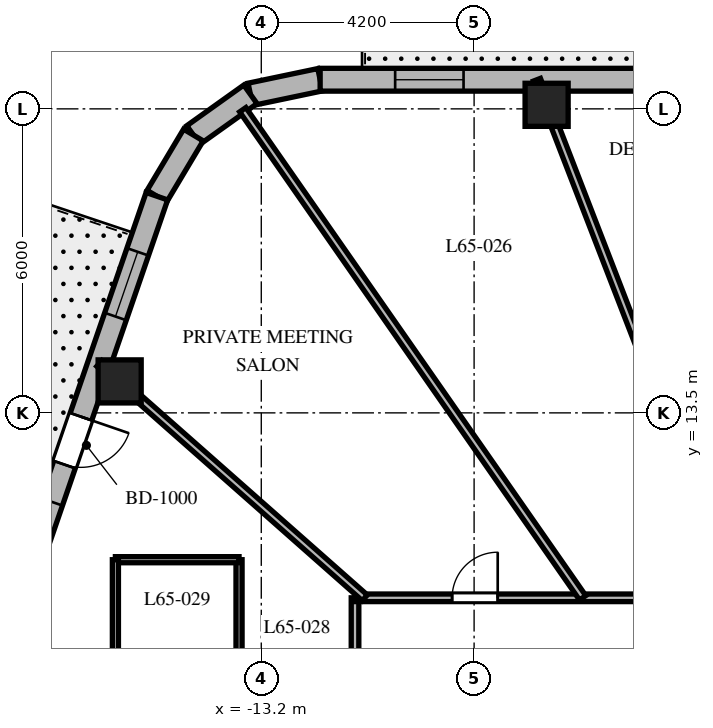
"""IFC4 building model, lengths in metres.
Left out: names, types, materials, properties, quantities, classifications, styles, units other than length and angle.
Written with IfcOpenShell. Run it as: python <this file> out.ifc"""

import sys

from ifc_helpers import new_model, si_unit, direction, frame, frame_2d, origin, origin_2d, place, context, subcontext, project, spatial, rectangle, extrude, element, fill, save


model = new_model("IFC4")
c1 = context("Model", 3, precision=1e-05, world=origin(), true_north=direction((0.0, 1.0)))
c2 = subcontext(c1, "Body", "Model", "MODEL_VIEW")
j1 = project(units=[si_unit("LENGTHUNIT", "METRE"), si_unit("PLANEANGLEUNIT", "RADIAN")], contexts=[c1])
p1 = place(None, origin())
s1 = spatial("IfcSite", under=j1, at=p1, CompositionType="ELEMENT")
p2 = place(p1, origin())
s2 = spatial("IfcBuilding", under=s1, at=p2, CompositionType="ELEMENT")
p3 = place(p2, frame((0.0, 0.0, 261.3)))
s3 = spatial("IfcBuildingStorey", under=s2, at=p3, CompositionType="ELEMENT", Elevation=261.3)
for number, where, z_axis, x_axis in (
    (1, (-7.569, 19.58, 0.0), (0.0, 0.0, 1.0), (1.0, 0.0, 0.0)),
    (2, (-15.995, 14.121, 0.0), (0.0, 0.0, 1.0), (1.0, 0.0, 0.0)),
):
    element("IfcColumn", number, at=place(p3, frame(where, z_axis=z_axis, x_axis=x_axis)), inside=s3, PredefinedType="COLUMN", context=c2, shape_type="SweptSolid", body=[
        extrude(rectangle(XDim=0.85, YDim=0.85, at=origin_2d()), origin(), (0.0, 0.0, 1.0), 3.9),
    ])
p4 = place(p3, frame((-12.038, 20.075, 0.0), z_axis=(0.0, 0.0, 1.0), x_axis=(-0.978750122553, -0.205056571711, 0.0)))
e3 = element("IfcWall", 3, at=p4, inside=s3, PredefinedType="SOLIDWALL", context=c2, shape_type="SweptSolid", body=[
    extrude(rectangle(XDim=1.406, YDim=0.45, at=frame_2d((0.703, 0.0))), origin(), (0.0, 0.0, 1.0), 3.6),
])
p5 = place(p3, frame((-13.415, 19.787, 0.0), z_axis=(0.0, 0.0, 1.0), x_axis=(-0.814055493997, -0.580787097561, 0.0)))
e4 = element("IfcWall", 4, at=p5, inside=s3, PredefinedType="SOLIDWALL", context=c2, shape_type="SweptSolid", body=[
    extrude(rectangle(XDim=1.383, YDim=0.45, at=frame_2d((0.691, 0.0))), origin(), (0.0, 0.0, 1.0), 3.6),
])
p6 = place(p3, frame((-14.54, 18.984, 0.0), z_axis=(0.0, 0.0, 1.0), x_axis=(-0.512374906623, -0.858761873317, 0.0)))
e5 = element("IfcWall", 5, at=p6, inside=s3, PredefinedType="SOLIDWALL", context=c2, shape_type="SweptSolid", body=[
    extrude(rectangle(XDim=1.406, YDim=0.45, at=frame_2d((0.703, 0.0))), origin(), (0.0, 0.0, 1.0), 3.6),
])
p7 = place(p3, frame((10.379, 20.075, 0.0), z_axis=(0.0, 0.0, 1.0), x_axis=(-1.0, 0.0, 0.0)))
e6 = element("IfcWall", 6, at=p7, inside=s3, PredefinedType="SOLIDWALL", context=c2, shape_type="SweptSolid", body=[
    extrude(rectangle(XDim=22.417, YDim=0.45, at=frame_2d((11.208, 0.0))), origin(), (0.0, 0.0, 1.0), 3.6),
])
p8 = place(p7, frame((2.302, 0.0, 0.0)))
e7 = element("IfcOpeningElement", 7, at=p8, cuts=e6, PredefinedType="OPENING", context=c2, shape_type="SweptSolid", body=[
    extrude(rectangle(XDim=0.95, YDim=2.15, at=frame_2d((0.475, 1.075))), frame((0.0, 0.235, 0.0), z_axis=(0.0, -1.0, 0.0), x_axis=(1.0, 0.0, 0.0)), (0.0, 0.0, 1.0), 0.47),
])
p9 = place(p7, frame((7.022, 0.0, 0.8)))
e8 = element("IfcOpeningElement", 8, at=p9, cuts=e6, PredefinedType="OPENING", context=c2, shape_type="SweptSolid", body=[
    extrude(rectangle(XDim=1.35, YDim=1.75, at=frame_2d((0.675, 0.875))), frame((0.0, 0.235, 0.0), z_axis=(0.0, -1.0, 0.0), x_axis=(1.0, 0.0, 0.0)), (0.0, 0.0, 1.0), 0.47),
])
p10 = place(p7, frame((13.18, 0.0, 0.8)))
e9 = element("IfcOpeningElement", 9, at=p10, cuts=e6, PredefinedType="OPENING", context=c2, shape_type="SweptSolid", body=[
    extrude(rectangle(XDim=1.35, YDim=1.75, at=frame_2d((0.675, 0.875))), frame((0.0, 0.235, 0.0), z_axis=(0.0, -1.0, 0.0), x_axis=(1.0, 0.0, 0.0)), (0.0, 0.0, 1.0), 0.47),
])
p11 = place(p7, frame((19.587, 0.0, 0.8)))
e10 = element("IfcOpeningElement", 10, at=p11, cuts=e6, PredefinedType="OPENING", context=c2, shape_type="SweptSolid", body=[
    extrude(rectangle(XDim=1.35, YDim=1.75, at=frame_2d((0.675, 0.875))), frame((0.0, 0.235, 0.0), z_axis=(0.0, -1.0, 0.0), x_axis=(1.0, 0.0, 0.0)), (0.0, 0.0, 1.0), 0.47),
])
p12 = place(p3, frame((-15.26, 17.776, 0.0), z_axis=(0.0, 0.0, 1.0), x_axis=(-0.325407437101, -0.945573899745, 0.0)))
e11 = element("IfcWall", 11, at=p12, inside=s3, PredefinedType="SOLIDWALL", context=c2, shape_type="SweptSolid", body=[
    extrude(rectangle(XDim=18.552, YDim=0.45, at=frame_2d((9.276, 0.0))), origin(), (0.0, 0.0, 1.0), 3.6),
])
p13 = place(p12, frame((4.602, 0.0, 0.0)))
e12 = element("IfcOpeningElement", 12, at=p13, cuts=e11, PredefinedType="OPENING", context=c2, shape_type="SweptSolid", body=[
    extrude(rectangle(XDim=1.0, YDim=2.15, at=frame_2d((0.5, 1.075))), frame((0.0, 0.235, 0.0), z_axis=(0.0, -1.0, 0.0), x_axis=(1.0, 0.0, 0.0)), (0.0, 0.0, 1.0), 0.47),
])
p14 = place(p12, frame((1.161, 0.0, 0.8)))
e13 = element("IfcOpeningElement", 13, at=p14, cuts=e11, PredefinedType="OPENING", context=c2, shape_type="SweptSolid", body=[
    extrude(rectangle(XDim=1.35, YDim=1.75, at=frame_2d((0.675, 0.875))), frame((0.0, 0.235, 0.0), z_axis=(0.0, -1.0, 0.0), x_axis=(1.0, 0.0, 0.0)), (0.0, 0.0, 1.0), 0.47),
])
p15 = place(p12, frame((6.379, 0.0, 0.8)))
e14 = element("IfcOpeningElement", 14, at=p15, cuts=e11, PredefinedType="OPENING", context=c2, shape_type="SweptSolid", body=[
    extrude(rectangle(XDim=1.35, YDim=1.75, at=frame_2d((0.675, 0.875))), frame((0.0, 0.235, 0.0), z_axis=(0.0, -1.0, 0.0), x_axis=(1.0, 0.0, 0.0)), (0.0, 0.0, 1.0), 0.47),
])
p16 = place(p12, frame((11.561, 0.0, 0.8)))
e15 = element("IfcOpeningElement", 15, at=p16, cuts=e11, PredefinedType="OPENING", context=c2, shape_type="SweptSolid", body=[
    extrude(rectangle(XDim=1.35, YDim=1.75, at=frame_2d((0.675, 0.875))), frame((0.0, 0.235, 0.0), z_axis=(0.0, -1.0, 0.0), x_axis=(1.0, 0.0, 0.0)), (0.0, 0.0, 1.0), 0.47),
])
p17 = place(p12, frame((15.987, 0.0, 0.8)))
e16 = element("IfcOpeningElement", 16, at=p17, cuts=e11, PredefinedType="OPENING", context=c2, shape_type="SweptSolid", body=[
    extrude(rectangle(XDim=1.35, YDim=1.75, at=frame_2d((0.675, 0.875))), frame((0.0, 0.235, 0.0), z_axis=(0.0, -1.0, 0.0), x_axis=(1.0, 0.0, 0.0)), (0.0, 0.0, 1.0), 0.47),
])
p18 = place(p3, frame((-11.35, 4.4, 0.0), z_axis=(0.0, 0.0, 1.0), x_axis=(0.0, 1.0, 0.0)))
e17 = element("IfcWall", 17, at=p18, inside=s3, PredefinedType="PARTITIONING", context=c2, shape_type="SweptSolid", body=[
    extrude(rectangle(XDim=5.45, YDim=0.15, at=frame_2d((2.725, 0.0))), origin(), (0.0, 0.0, 1.0), 3.09),
])
p19 = place(p18, frame((2.458, 0.0, 0.0)))
e18 = element("IfcOpeningElement", 18, at=p19, cuts=e17, PredefinedType="OPENING", context=c2, shape_type="SweptSolid", body=[
    extrude(rectangle(XDim=0.95, YDim=2.03, at=frame_2d((0.475, 1.015))), frame((0.0, 0.085, 0.0), z_axis=(0.0, -1.0, 0.0), x_axis=(1.0, 0.0, 0.0)), (0.0, 0.0, 1.0), 0.17),
])
p20 = place(p3, frame((-11.35, 9.85, 0.0), z_axis=(0.0, 0.0, 1.0), x_axis=(1.0, 0.0, 0.0)))
e19 = element("IfcWall", 19, at=p20, inside=s3, PredefinedType="PARTITIONING", context=c2, shape_type="SweptSolid", body=[
    extrude(rectangle(XDim=10.43, YDim=0.15, at=frame_2d((5.215, 0.0))), origin(), (0.0, 0.0, 1.0), 3.09),
])
p21 = place(p20, frame((8.382, 0.0, 0.0)))
e20 = element("IfcOpeningElement", 20, at=p21, cuts=e19, PredefinedType="OPENING", context=c2, shape_type="SweptSolid", body=[
    extrude(rectangle(XDim=0.95, YDim=2.03, at=frame_2d((0.475, 1.015))), frame((0.0, 0.085, 0.0), z_axis=(0.0, -1.0, 0.0), x_axis=(1.0, 0.0, 0.0)), (0.0, 0.0, 1.0), 0.17),
])
p22 = place(p20, frame((5.541, 0.0, 0.0)))
e21 = element("IfcOpeningElement", 21, at=p22, cuts=e19, PredefinedType="OPENING", context=c2, shape_type="SweptSolid", body=[
    extrude(rectangle(XDim=0.9, YDim=2.03, at=frame_2d((0.45, 1.015))), frame((0.0, 0.085, 0.0), z_axis=(0.0, -1.0, 0.0), x_axis=(1.0, 0.0, 0.0)), (0.0, 0.0, 1.0), 0.17),
])
p23 = place(p20, frame((1.916, 0.0, 0.0)))
e22 = element("IfcOpeningElement", 22, at=p23, cuts=e19, PredefinedType="OPENING", context=c2, shape_type="SweptSolid", body=[
    extrude(rectangle(XDim=0.9, YDim=2.03, at=frame_2d((0.45, 1.015))), frame((0.0, 0.085, 0.0), z_axis=(0.0, -1.0, 0.0), x_axis=(1.0, 0.0, 0.0)), (0.0, 0.0, 1.0), 0.17),
])
p24 = place(p3, frame((-3.808, 9.85, 0.0), z_axis=(0.0, 0.0, 1.0), x_axis=(-0.360587327934, 0.932725457427, 0.0)))
e23 = element("IfcWall", 23, at=p24, inside=s3, PredefinedType="PARTITIONING", context=c2, shape_type="SweptSolid", body=[
    extrude(rectangle(XDim=10.962, YDim=0.15, at=frame_2d((5.481, 0.0))), origin(), (0.0, 0.0, 1.0), 2.94),
])
p25 = place(p3, frame((-6.858, 9.85, 0.0), z_axis=(0.0, 0.0, 1.0), x_axis=(-0.571391702066, 0.820677477948, 0.0)))
e24 = element("IfcWall", 24, at=p25, inside=s3, PredefinedType="PARTITIONING", context=c2, shape_type="SweptSolid", body=[
    extrude(rectangle(XDim=11.738, YDim=0.15, at=frame_2d((5.869, 0.0))), origin(), (0.0, 0.0, 1.0), 2.94),
])
p26 = place(p3, frame((-11.157, 9.85, 0.0), z_axis=(0.0, 0.0, 1.0), x_axis=(-0.74966962095, 0.661812253909, 0.0)))
e25 = element("IfcWall", 25, at=p26, inside=s3, PredefinedType="PARTITIONING", context=c2, shape_type="SweptSolid", body=[
    extrude(rectangle(XDim=6.989, YDim=0.15, at=frame_2d((3.494, 0.0))), origin(), (0.0, 0.0, 1.0), 2.94),
])
p27 = place(p3, frame((-13.639, 7.992, 0.0), z_axis=(0.0, 0.0, 1.0), x_axis=(0.0, 1.0, 0.0)))
e26 = element("IfcWall", 26, at=p27, inside=s3, PredefinedType="PARTITIONING", context=c2, shape_type="SweptSolid", body=[
    extrude(rectangle(XDim=2.61, YDim=0.12, at=frame_2d((1.305, 0.0))), origin(), (0.0, 0.0, 1.0), 3.6),
])
p28 = place(p3, frame((-13.639, 10.602, 0.0), z_axis=(0.0, 0.0, 1.0), x_axis=(-1.0, 0.0, 0.0)))
e27 = element("IfcWall", 27, at=p28, inside=s3, PredefinedType="PARTITIONING", context=c2, shape_type="SweptSolid", body=[
    extrude(rectangle(XDim=2.44, YDim=0.12, at=frame_2d((1.22, 0.0))), origin(), (0.0, 0.0, 1.0), 3.172),
])
p29 = place(p3, frame((-16.079, 10.602, 0.0), z_axis=(0.0, 0.0, 1.0), x_axis=(0.0, -1.0, 0.0)))
e28 = element("IfcWall", 28, at=p29, inside=s3, PredefinedType="PARTITIONING", context=c2, shape_type="SweptSolid", body=[
    extrude(rectangle(XDim=2.61, YDim=0.12, at=frame_2d((1.305, 0.0))), origin(), (0.0, 0.0, 1.0), 3.6),
])
p30 = place(p11, origin())
e29 = element("IfcWindow", 29, at=p30, inside=s3, PartitioningType="SINGLE_PANEL", PredefinedType="WINDOW", context=c2, shape_type="SweptSolid", body=[
    extrude(rectangle(XDim=1.35, YDim=1.75, at=frame_2d((0.675, 0.875))), frame((0.0, 0.03, 0.0), z_axis=(0.0, -1.0, 0.0), x_axis=(1.0, 0.0, 0.0)), (0.0, 0.0, 1.0), 0.06),
])
fill(e10, e29)
p31 = place(p13, origin())
e30 = element("IfcDoor", 30, at=p31, inside=s3, OperationType="SINGLE_SWING_LEFT", PredefinedType="DOOR", context=c2, shape_type="SweptSolid", body=[
    extrude(rectangle(XDim=1.0, YDim=2.15, at=frame_2d((0.5, 1.075))), frame((0.0, 0.025, 0.0), z_axis=(0.0, -1.0, 0.0), x_axis=(1.0, 0.0, 0.0)), (0.0, 0.0, 1.0), 0.05),
])
fill(e12, e30)
p32 = place(p14, origin())
e31 = element("IfcWindow", 31, at=p32, inside=s3, PartitioningType="SINGLE_PANEL", PredefinedType="WINDOW", context=c2, shape_type="SweptSolid", body=[
    extrude(rectangle(XDim=1.35, YDim=1.75, at=frame_2d((0.675, 0.875))), frame((0.0, 0.03, 0.0), z_axis=(0.0, -1.0, 0.0), x_axis=(1.0, 0.0, 0.0)), (0.0, 0.0, 1.0), 0.06),
])
fill(e13, e31)
p33 = place(p15, origin())
e32 = element("IfcWindow", 32, at=p33, inside=s3, PartitioningType="SINGLE_PANEL", PredefinedType="WINDOW", context=c2, shape_type="SweptSolid", body=[
    extrude(rectangle(XDim=1.35, YDim=1.75, at=frame_2d((0.675, 0.875))), frame((0.0, 0.03, 0.0), z_axis=(0.0, -1.0, 0.0), x_axis=(1.0, 0.0, 0.0)), (0.0, 0.0, 1.0), 0.06),
])
fill(e14, e32)
p34 = place(p23, origin())
e33 = element("IfcDoor", 33, at=p34, inside=s3, OperationType="SINGLE_SWING_RIGHT", PredefinedType="DOOR", context=c2, shape_type="SweptSolid", body=[
    extrude(rectangle(XDim=0.9, YDim=2.03, at=frame_2d((0.45, 1.015))), frame((0.0, 0.025, 0.0), z_axis=(0.0, -1.0, 0.0), x_axis=(1.0, 0.0, 0.0)), (0.0, 0.0, 1.0), 0.05),
])
fill(e22, e33)
save(model, sys.argv[1])
